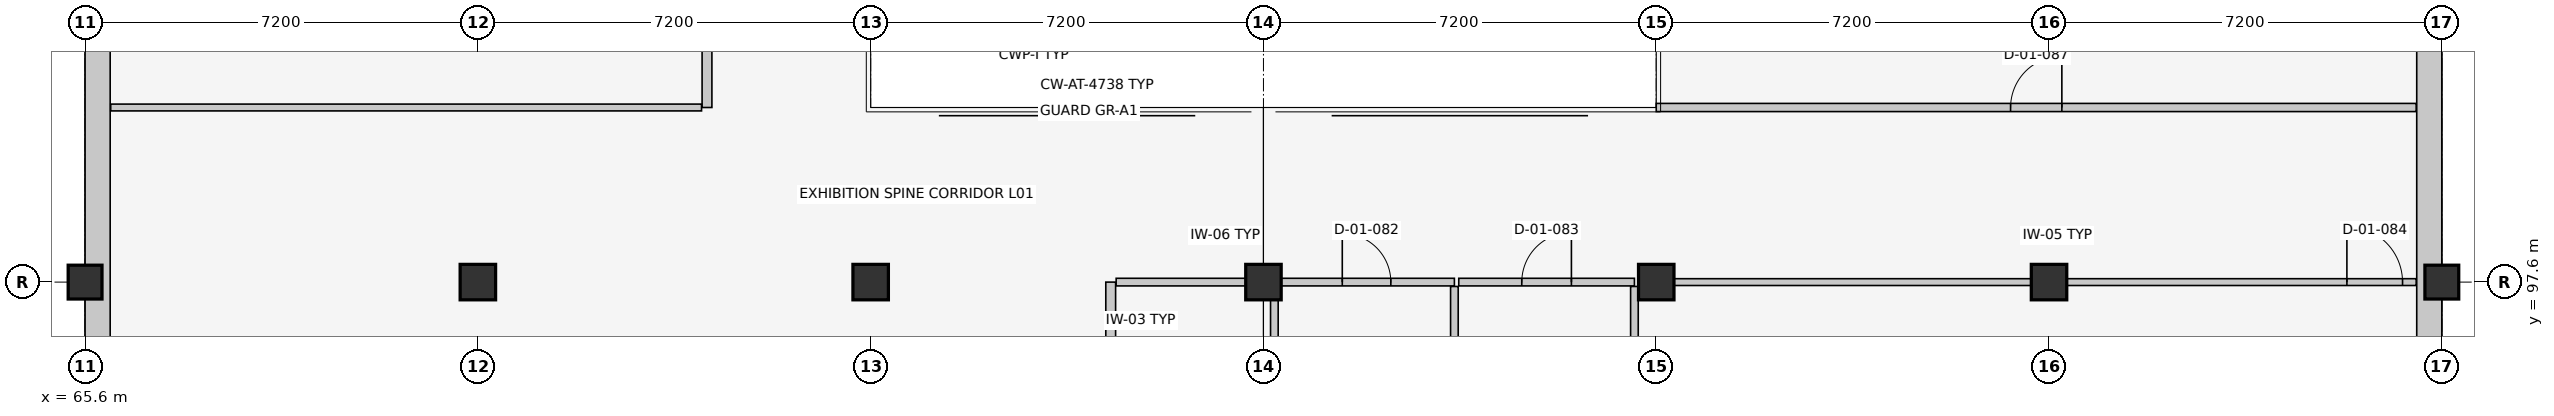
"""IFC4 building model, lengths in metres.
Left out: names, types, materials, properties, quantities, classifications, styles, units other than length and angle.
Written with IfcOpenShell. Run it as: python <this file> out.ifc"""

import sys

from ifc_helpers import new_model, si_unit, direction, frame, frame_2d, origin, origin_2d, place, context, subcontext, project, spatial, rectangle, extrude, element, fill, save


model = new_model("IFC4")
c1 = context("Model", 3, precision=1e-05, world=origin(), true_north=direction((0.0, 1.0)))
c2 = subcontext(c1, "Body", "Model", "MODEL_VIEW")
j1 = project(units=[si_unit("LENGTHUNIT", "METRE"), si_unit("PLANEANGLEUNIT", "RADIAN")], contexts=[c1])
p1 = place(None, origin())
s1 = spatial("IfcSite", under=j1, at=p1, CompositionType="ELEMENT")
p2 = place(p1, origin())
s2 = spatial("IfcBuilding", under=s1, at=p2, CompositionType="ELEMENT")
p3 = place(p2, frame((0.0, 0.0, 5.4)))
s3 = spatial("IfcBuildingStorey", under=s2, at=p3, CompositionType="ELEMENT", Elevation=5.4)
p4 = place(p3, frame((65.6, 97.6, 0.0), z_axis=(0.0, 0.0, 1.0), x_axis=(1.0, 0.0, 0.0)))
e1 = element("IfcColumn", 1, at=p4, inside=s3, PredefinedType="COLUMN", context=c2, shape_type="SweptSolid", body=[
    extrude(rectangle(XDim=0.62, YDim=0.62, at=origin_2d()), origin(), (0.0, 0.0, 1.0), 4.2),
])
for number, where, z_axis, x_axis in (
    (2, (72.8, 97.6, 0.0), (0.0, 0.0, 1.0), (1.0, 0.0, 0.0)),
    (3, (80.0, 97.6, 0.0), (0.0, 0.0, 1.0), (1.0, 0.0, 0.0)),
    (4, (87.2, 97.6, 0.0), (0.0, 0.0, 1.0), (1.0, 0.0, 0.0)),
    (5, (94.4, 97.6, 0.0), (0.0, 0.0, 1.0), (1.0, 0.0, 0.0)),
    (6, (101.6, 97.6, 0.0), (0.0, 0.0, 1.0), (1.0, 0.0, 0.0)),
):
    element("IfcColumn", number, at=place(p3, frame(where, z_axis=z_axis, x_axis=x_axis)), inside=s3, PredefinedType="COLUMN", context=c2, shape_type="SweptSolid", body=[
        extrude(rectangle(XDim=0.65, YDim=0.65, at=origin_2d()), origin(), (0.0, 0.0, 1.0), 4.2),
    ])
p5 = place(p3, frame((108.8, 97.6, 0.0), z_axis=(0.0, 0.0, 1.0), x_axis=(1.0, 0.0, 0.0)))
e7 = element("IfcColumn", 7, at=p5, inside=s3, PredefinedType="COLUMN", context=c2, shape_type="SweptSolid", body=[
    extrude(rectangle(XDim=0.62, YDim=0.62, at=origin_2d()), origin(), (0.0, 0.0, 1.0), 4.2),
])
p6 = place(p3, frame((108.57, 119.0, 0.0), z_axis=(0.0, 0.0, 1.0), x_axis=(0.0, -1.0, 0.0)))
e8 = element("IfcWall", 8, at=p6, inside=s3, PredefinedType="SOLIDWALL", context=c2, shape_type="SweptSolid", body=[
    extrude(rectangle(XDim=28.6, YDim=0.46, at=frame_2d((14.3, 0.0))), origin(), (0.0, 0.0, 1.0), 3.175),
])
p7 = place(p6, frame((1.418, 0.0, 0.9)))
e9 = element("IfcOpeningElement", 9, at=p7, cuts=e8, PredefinedType="OPENING", context=c2, shape_type="SweptSolid", body=[
    extrude(rectangle(XDim=1.25, YDim=1.45, at=frame_2d((0.625, 0.725))), frame((0.0, 0.242, 0.0), z_axis=(0.0, -1.0, 0.0), x_axis=(1.0, 0.0, 0.0)), (0.0, 0.0, 1.0), 0.484),
])
p8 = place(p6, frame((9.489, 0.0, 0.9)))
e10 = element("IfcOpeningElement", 10, at=p8, cuts=e8, PredefinedType="OPENING", context=c2, shape_type="SweptSolid", body=[
    extrude(rectangle(XDim=1.45, YDim=1.45, at=frame_2d((0.725, 0.725))), frame((0.0, 0.242, 0.0), z_axis=(0.0, -1.0, 0.0), x_axis=(1.0, 0.0, 0.0)), (0.0, 0.0, 1.0), 0.484),
])
p9 = place(p6, frame((25.932, 0.0, 0.9)))
e11 = element("IfcOpeningElement", 11, at=p9, cuts=e8, PredefinedType="OPENING", context=c2, shape_type="SweptSolid", body=[
    extrude(rectangle(XDim=1.25, YDim=1.6, at=frame_2d((0.625, 0.8))), frame((0.0, 0.242, 0.0), z_axis=(0.0, -1.0, 0.0), x_axis=(1.0, 0.0, 0.0)), (0.0, 0.0, 1.0), 0.484),
])
p10 = place(p3, frame((65.83, 90.4, 0.0), z_axis=(0.0, 0.0, 1.0), x_axis=(0.0, 1.0, 0.0)))
e12 = element("IfcWall", 12, at=p10, inside=s3, PredefinedType="SOLIDWALL", context=c2, shape_type="SweptSolid", body=[
    extrude(rectangle(XDim=28.6, YDim=0.46, at=frame_2d((14.3, 0.0))), origin(), (0.0, 0.0, 1.0), 3.175),
])
p11 = place(p10, frame((1.393, 0.0, 0.9)))
e13 = element("IfcOpeningElement", 13, at=p11, cuts=e12, PredefinedType="OPENING", context=c2, shape_type="SweptSolid", body=[
    extrude(rectangle(XDim=1.3, YDim=1.35, at=frame_2d((0.65, 0.675))), frame((0.0, 0.242, 0.0), z_axis=(0.0, -1.0, 0.0), x_axis=(1.0, 0.0, 0.0)), (0.0, 0.0, 1.0), 0.484),
])
p12 = place(p10, frame((17.811, 0.0, 0.9)))
e14 = element("IfcOpeningElement", 14, at=p12, cuts=e12, PredefinedType="OPENING", context=c2, shape_type="SweptSolid", body=[
    extrude(rectangle(XDim=1.15, YDim=1.45, at=frame_2d((0.575, 0.725))), frame((0.0, 0.242, 0.0), z_axis=(0.0, -1.0, 0.0), x_axis=(1.0, 0.0, 0.0)), (0.0, 0.0, 1.0), 0.484),
])
p13 = place(p10, frame((25.882, 0.0, 0.9)))
e15 = element("IfcOpeningElement", 15, at=p13, cuts=e12, PredefinedType="OPENING", context=c2, shape_type="SweptSolid", body=[
    extrude(rectangle(XDim=1.35, YDim=1.45, at=frame_2d((0.675, 0.725))), frame((0.0, 0.242, 0.0), z_axis=(0.0, -1.0, 0.0), x_axis=(1.0, 0.0, 0.0)), (0.0, 0.0, 1.0), 0.484),
])
p14 = place(p3, frame((84.4, 94.0, 0.0), z_axis=(0.0, 0.0, 1.0), x_axis=(0.0, 1.0, 0.0)))
e16 = element("IfcWall", 16, at=p14, inside=s3, PredefinedType="PARTITIONING", context=c2, shape_type="SweptSolid", body=[
    extrude(rectangle(XDim=3.6, YDim=0.18, at=frame_2d((1.8, 0.0))), origin(), (0.0, 0.0, 1.0), 3.92),
])
p15 = place(p14, frame((1.27, 0.0, 0.0)))
e17 = element("IfcOpeningElement", 17, at=p15, cuts=e16, PredefinedType="OPENING", context=c2, shape_type="SweptSolid", body=[
    extrude(rectangle(XDim=1.06, YDim=2.1, at=frame_2d((0.53, 1.05))), frame((0.0, 0.102, 0.0), z_axis=(0.0, -1.0, 0.0), x_axis=(1.0, 0.0, 0.0)), (0.0, 0.0, 1.0), 0.204),
])
p16 = place(p3, frame((84.5, 97.6, 0.0), z_axis=(0.0, 0.0, 1.0), x_axis=(1.0, 0.0, 0.0)))
e18 = element("IfcWall", 18, at=p16, inside=s3, PredefinedType="PARTITIONING", context=c2, shape_type="SweptSolid", body=[
    extrude(rectangle(XDim=2.9, YDim=0.14, at=frame_2d((1.45, 0.0))), origin(), (0.0, 0.0, 1.0), 3.145),
])
p17 = place(p3, frame((87.4, 90.815, 0.0), z_axis=(0.0, 0.0, 1.0), x_axis=(0.0, 1.0, 0.0)))
e19 = element("IfcWall", 19, at=p17, inside=s3, PredefinedType="PARTITIONING", context=c2, shape_type="SweptSolid", body=[
    extrude(rectangle(XDim=6.705, YDim=0.14, at=frame_2d((3.353, 0.0))), origin(), (0.0, 0.0, 1.0), 3.295),
])
p18 = place(p3, frame((87.48, 97.6, 0.0), z_axis=(0.0, 0.0, 1.0), x_axis=(1.0, 0.0, 0.0)))
e20 = element("IfcWall", 20, at=p18, inside=s3, PredefinedType="PARTITIONING", context=c2, shape_type="SweptSolid", body=[
    extrude(rectangle(XDim=3.22, YDim=0.14, at=frame_2d((1.61, 0.0))), origin(), (0.0, 0.0, 1.0), 3.095),
])
p19 = place(p18, frame((1.165, 0.0, 0.0)))
e21 = element("IfcOpeningElement", 21, at=p19, cuts=e20, PredefinedType="OPENING", context=c2, shape_type="SweptSolid", body=[
    extrude(rectangle(XDim=0.89, YDim=2.05, at=frame_2d((0.445, 1.025))), frame((0.0, 0.082, 0.0), z_axis=(0.0, -1.0, 0.0), x_axis=(1.0, 0.0, 0.0)), (0.0, 0.0, 1.0), 0.164),
])
p20 = place(p3, frame((90.7, 90.815, 0.0), z_axis=(0.0, 0.0, 1.0), x_axis=(0.0, 1.0, 0.0)))
e22 = element("IfcWall", 22, at=p20, inside=s3, PredefinedType="PARTITIONING", context=c2, shape_type="SweptSolid", body=[
    extrude(rectangle(XDim=6.705, YDim=0.14, at=frame_2d((3.353, 0.0))), origin(), (0.0, 0.0, 1.0), 3.685),
])
p21 = place(p3, frame((90.78, 97.6, 0.0), z_axis=(0.0, 0.0, 1.0), x_axis=(1.0, 0.0, 0.0)))
e23 = element("IfcWall", 23, at=p21, inside=s3, PredefinedType="PARTITIONING", context=c2, shape_type="SweptSolid", body=[
    extrude(rectangle(XDim=3.22, YDim=0.14, at=frame_2d((1.61, 0.0))), origin(), (0.0, 0.0, 1.0), 3.095),
])
p22 = place(p21, frame((1.155, 0.0, 0.0)))
e24 = element("IfcOpeningElement", 24, at=p22, cuts=e23, PredefinedType="OPENING", context=c2, shape_type="SweptSolid", body=[
    extrude(rectangle(XDim=0.91, YDim=2.06, at=frame_2d((0.455, 1.03))), frame((0.0, 0.082, 0.0), z_axis=(0.0, -1.0, 0.0), x_axis=(1.0, 0.0, 0.0)), (0.0, 0.0, 1.0), 0.164),
])
p23 = place(p3, frame((94.0, 90.815, 0.0), z_axis=(0.0, 0.0, 1.0), x_axis=(0.0, 1.0, 0.0)))
e25 = element("IfcWall", 25, at=p23, inside=s3, PredefinedType="PARTITIONING", context=c2, shape_type="SweptSolid", body=[
    extrude(rectangle(XDim=6.705, YDim=0.14, at=frame_2d((3.353, 0.0))), origin(), (0.0, 0.0, 1.0), 3.92),
])
p24 = place(p3, frame((94.08, 97.6, 0.0), z_axis=(0.0, 0.0, 1.0), x_axis=(1.0, 0.0, 0.0)))
e26 = element("IfcWall", 26, at=p24, inside=s3, PredefinedType="PARTITIONING", context=c2, shape_type="SweptSolid", body=[
    extrude(rectangle(XDim=14.25, YDim=0.125, at=frame_2d((7.125, 0.0))), origin(), (0.0, 0.0, 1.0), 3.045),
])
p25 = place(p24, frame((12.98, 0.0, 0.0)))
e27 = element("IfcOpeningElement", 27, at=p25, cuts=e26, PredefinedType="OPENING", context=c2, shape_type="SweptSolid", body=[
    extrude(rectangle(XDim=1.02, YDim=2.12, at=frame_2d((0.51, 1.06))), frame((0.0, 0.074, 0.0), z_axis=(0.0, -1.0, 0.0), x_axis=(1.0, 0.0, 0.0)), (0.0, 0.0, 1.0), 0.149),
])
p26 = place(p3, frame((77.0, 100.8, 0.0), z_axis=(0.0, 0.0, 1.0), x_axis=(0.0, 1.0, 0.0)))
e28 = element("IfcWall", 28, at=p26, inside=s3, PredefinedType="PARTITIONING", context=c2, shape_type="SweptSolid", body=[
    extrude(rectangle(XDim=17.73, YDim=0.18, at=frame_2d((8.865, 0.0))), origin(), (0.0, 0.0, 1.0), 3.92),
])
p27 = place(p26, frame((8.375, 0.0, 0.0)))
e29 = element("IfcOpeningElement", 29, at=p27, cuts=e28, PredefinedType="OPENING", context=c2, shape_type="SweptSolid", body=[
    extrude(rectangle(XDim=0.98, YDim=2.12, at=frame_2d((0.49, 1.06))), frame((0.0, 0.102, 0.0), z_axis=(0.0, -1.0, 0.0), x_axis=(1.0, 0.0, 0.0)), (0.0, 0.0, 1.0), 0.204),
])
p28 = place(p3, frame((66.07, 100.8, 0.0), z_axis=(0.0, 0.0, 1.0), x_axis=(1.0, 0.0, 0.0)))
e30 = element("IfcWall", 30, at=p28, inside=s3, PredefinedType="PARTITIONING", context=c2, shape_type="SweptSolid", body=[
    extrude(rectangle(XDim=10.83, YDim=0.125, at=frame_2d((5.415, 0.0))), origin(), (0.0, 0.0, 1.0), 3.92),
])
p29 = place(p3, frame((94.4, 100.8, 0.0), z_axis=(0.0, 0.0, 1.0), x_axis=(1.0, 0.0, 0.0)))
e31 = element("IfcWall", 31, at=p29, inside=s3, PredefinedType="PARTITIONING", context=c2, shape_type="SweptSolid", body=[
    extrude(rectangle(XDim=13.93, YDim=0.15, at=frame_2d((6.965, 0.0))), origin(), (0.0, 0.0, 1.0), 3.92),
])
p30 = place(p29, frame((6.495, 0.0, 0.0)))
e32 = element("IfcOpeningElement", 32, at=p30, cuts=e31, PredefinedType="OPENING", context=c2, shape_type="SweptSolid", body=[
    extrude(rectangle(XDim=0.94, YDim=2.1, at=frame_2d((0.47, 1.05))), frame((0.0, 0.087, 0.0), z_axis=(0.0, -1.0, 0.0), x_axis=(1.0, 0.0, 0.0)), (0.0, 0.0, 1.0), 0.174),
])
p31 = place(p19, origin())
e33 = element("IfcDoor", 33, at=p31, inside=s3, OperationType="SINGLE_SWING_LEFT", PredefinedType="DOOR", context=c2, shape_type="SweptSolid", body=[
    extrude(rectangle(XDim=0.89, YDim=2.05, at=frame_2d((0.445, 1.025))), frame((0.0, 0.025, 0.0), z_axis=(0.0, -1.0, 0.0), x_axis=(1.0, 0.0, 0.0)), (0.0, 0.0, 1.0), 0.05),
])
fill(e21, e33)
p32 = place(p22, origin())
e34 = element("IfcDoor", 34, at=p32, inside=s3, OperationType="SINGLE_SWING_RIGHT", PredefinedType="DOOR", context=c2, shape_type="SweptSolid", body=[
    extrude(rectangle(XDim=0.91, YDim=2.06, at=frame_2d((0.455, 1.03))), frame((0.0, 0.025, 0.0), z_axis=(0.0, -1.0, 0.0), x_axis=(1.0, 0.0, 0.0)), (0.0, 0.0, 1.0), 0.05),
])
fill(e24, e34)
p33 = place(p25, origin())
e35 = element("IfcDoor", 35, at=p33, inside=s3, OperationType="SINGLE_SWING_LEFT", PredefinedType="DOOR", context=c2, shape_type="SweptSolid", body=[
    extrude(rectangle(XDim=1.02, YDim=2.12, at=frame_2d((0.51, 1.06))), frame((0.0, 0.025, 0.0), z_axis=(0.0, -1.0, 0.0), x_axis=(1.0, 0.0, 0.0)), (0.0, 0.0, 1.0), 0.05),
])
fill(e27, e35)
p34 = place(p30, origin())
e36 = element("IfcDoor", 36, at=p34, inside=s3, OperationType="SINGLE_SWING_RIGHT", PredefinedType="DOOR", context=c2, shape_type="SweptSolid", body=[
    extrude(rectangle(XDim=0.94, YDim=2.1, at=frame_2d((0.47, 1.05))), frame((0.0, 0.025, 0.0), z_axis=(0.0, -1.0, 0.0), x_axis=(1.0, 0.0, 0.0)), (0.0, 0.0, 1.0), 0.05),
])
fill(e32, e36)
save(model, sys.argv[1])
